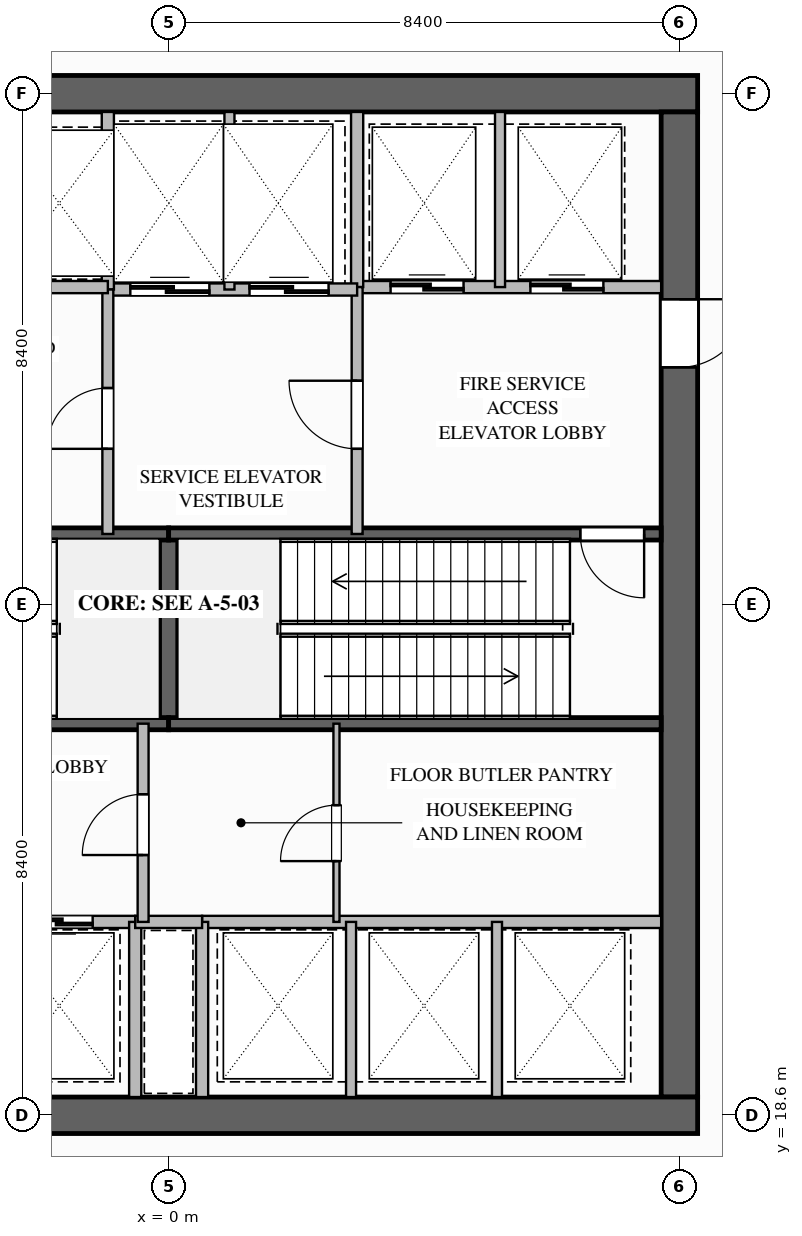
"""IFC4 building model, lengths in metres.
Left out: names, types, materials, properties, quantities, classifications, styles, units other than length and angle.
Written with IfcOpenShell. Run it as: python <this file> out.ifc"""

import sys

from ifc_helpers import new_model, si_unit, direction, frame, frame_2d, origin, place, context, subcontext, project, spatial, rectangle, extrude, element, fill, save


model = new_model("IFC4")
c1 = context("Model", 3, precision=1e-05, world=origin(), true_north=direction((0.0, 1.0)))
c2 = subcontext(c1, "Body", "Model", "MODEL_VIEW")
j1 = project(units=[si_unit("LENGTHUNIT", "METRE"), si_unit("PLANEANGLEUNIT", "RADIAN")], contexts=[c1])
p1 = place(None, origin())
s1 = spatial("IfcSite", under=j1, at=p1, CompositionType="ELEMENT")
p2 = place(p1, origin())
s2 = spatial("IfcBuilding", under=s1, at=p2, CompositionType="ELEMENT")
p3 = place(p2, frame((0.0, 0.0, 10.8)))
s3 = spatial("IfcBuildingStorey", under=s2, at=p3, CompositionType="ELEMENT", Elevation=10.8)
p4 = place(p3, frame((-8.7, 35.4, 0.0), z_axis=(0.0, 0.0, 1.0), x_axis=(1.0, 0.0, 0.0)))
e1 = element("IfcWall", 1, at=p4, inside=s3, PredefinedType="SHEAR", context=c2, shape_type="SweptSolid", body=[
    extrude(rectangle(XDim=17.4, YDim=0.6, at=frame_2d((8.7, 0.0))), origin(), (0.0, 0.0, 1.0), 6.4),
])
p5 = place(p3, frame((8.4, 35.1, 0.0), z_axis=(0.0, 0.0, 1.0), x_axis=(0.0, -1.0, 0.0)))
e2 = element("IfcWall", 2, at=p5, inside=s3, PredefinedType="SHEAR", context=c2, shape_type="SweptSolid", body=[
    extrude(rectangle(XDim=16.2, YDim=0.6, at=frame_2d((8.1, 0.0))), origin(), (0.0, 0.0, 1.0), 6.4),
])
p6 = place(p5, frame((3.08, 0.0, 0.0)))
e3 = element("IfcOpeningElement", 3, at=p6, cuts=e2, PredefinedType="OPENING", context=c2, shape_type="SweptSolid", body=[
    extrude(rectangle(XDim=1.12, YDim=2.1, at=frame_2d((0.56, 1.05))), frame((0.0, 0.31, 0.0), z_axis=(0.0, -1.0, 0.0), x_axis=(1.0, 0.0, 0.0)), (0.0, 0.0, 1.0), 0.62),
])
p7 = place(p3, frame((8.7, 18.6, 0.0), z_axis=(0.0, 0.0, 1.0), x_axis=(-1.0, 0.0, 0.0)))
e4 = element("IfcWall", 4, at=p7, inside=s3, PredefinedType="SHEAR", context=c2, shape_type="SweptSolid", body=[
    extrude(rectangle(XDim=17.4, YDim=0.6, at=frame_2d((8.7, 0.0))), origin(), (0.0, 0.0, 1.0), 6.4),
])
p8 = place(p3, frame((0.0, 25.04, 0.0), z_axis=(0.0, 0.0, 1.0), x_axis=(0.0, 1.0, 0.0)))
e5 = element("IfcWall", 5, at=p8, inside=s3, PredefinedType="SOLIDWALL", context=c2, shape_type="SweptSolid", body=[
    extrude(rectangle(XDim=3.12, YDim=0.3, at=frame_2d((1.56, 0.0))), origin(), (0.0, 0.0, 1.0), 6.1),
])
p9 = place(p3, frame((-8.1, 25.04, 0.0), z_axis=(0.0, 0.0, 1.0), x_axis=(1.0, 0.0, 0.0)))
e6 = element("IfcWall", 6, at=p9, inside=s3, PredefinedType="SOLIDWALL", context=c2, shape_type="SweptSolid", body=[
    extrude(rectangle(XDim=8.1, YDim=0.2, at=frame_2d((4.05, 0.0))), origin(), (0.0, 0.0, 1.0), 6.1),
])
p10 = place(p9, frame((0.28, 0.0, 0.0)))
e7 = element("IfcOpeningElement", 7, at=p10, cuts=e6, PredefinedType="OPENING", context=c2, shape_type="SweptSolid", body=[
    extrude(rectangle(XDim=1.05, YDim=2.1, at=frame_2d((0.525, 1.05))), frame((0.0, 0.11, 0.0), z_axis=(0.0, -1.0, 0.0), x_axis=(1.0, 0.0, 0.0)), (0.0, 0.0, 1.0), 0.22),
])
for number, where, z_axis, x_axis in (
    (8, (-8.1, 28.16, 0.0), (0.0, 0.0, 1.0), (1.0, 0.0, 0.0)),
    (9, (0.0, 25.04, 0.0), (0.0, 0.0, 1.0), (1.0, 0.0, 0.0)),
):
    element("IfcWall", number, at=place(p3, frame(where, z_axis=z_axis, x_axis=x_axis)), inside=s3, PredefinedType="SOLIDWALL", context=c2, shape_type="SweptSolid", body=[
        extrude(rectangle(XDim=8.1, YDim=0.2, at=frame_2d((4.05, 0.0))), origin(), (0.0, 0.0, 1.0), 6.1),
    ])
p11 = place(p3, frame((8.1, 28.16, 0.0), z_axis=(0.0, 0.0, 1.0), x_axis=(-1.0, 0.0, 0.0)))
e10 = element("IfcWall", 10, at=p11, inside=s3, PredefinedType="SOLIDWALL", context=c2, shape_type="SweptSolid", body=[
    extrude(rectangle(XDim=8.1, YDim=0.2, at=frame_2d((4.05, 0.0))), origin(), (0.0, 0.0, 1.0), 6.1),
])
p12 = place(p11, frame((0.28, 0.0, 0.0)))
e11 = element("IfcOpeningElement", 11, at=p12, cuts=e10, PredefinedType="OPENING", context=c2, shape_type="SweptSolid", body=[
    extrude(rectangle(XDim=1.05, YDim=2.1, at=frame_2d((0.525, 1.05))), frame((0.0, 0.11, 0.0), z_axis=(0.0, -1.0, 0.0), x_axis=(1.0, 0.0, 0.0)), (0.0, 0.0, 1.0), 0.22),
])
p13 = place(p3, frame((3.1, 32.22, 0.0), z_axis=(0.0, 0.0, 1.0), x_axis=(1.0, 0.0, 0.0)))
e12 = element("IfcWall", 12, at=p13, inside=s3, PredefinedType="SOLIDWALL", context=c2, shape_type="SweptSolid", body=[
    extrude(rectangle(XDim=5.0, YDim=0.2, at=frame_2d((2.5, 0.0))), origin(), (0.0, 0.0, 1.0), 6.1),
])
p14 = place(p13, frame((0.55, 0.0, 0.0)))
e13 = element("IfcOpeningElement", 13, at=p14, cuts=e12, PredefinedType="OPENING", context=c2, shape_type="SweptSolid", body=[
    extrude(rectangle(XDim=1.2, YDim=2.2, at=frame_2d((0.6, 1.1))), frame((0.0, 0.11, 0.0), z_axis=(0.0, -1.0, 0.0), x_axis=(1.0, 0.0, 0.0)), (0.0, 0.0, 1.0), 0.22),
])
p15 = place(p13, frame((2.85, 0.0, 0.0)))
e14 = element("IfcOpeningElement", 14, at=p15, cuts=e12, PredefinedType="OPENING", context=c2, shape_type="SweptSolid", body=[
    extrude(rectangle(XDim=1.2, YDim=2.2, at=frame_2d((0.6, 1.1))), frame((0.0, 0.11, 0.0), z_axis=(0.0, -1.0, 0.0), x_axis=(1.0, 0.0, 0.0)), (0.0, 0.0, 1.0), 0.22),
])
p16 = place(p3, frame((3.1, 32.22, 0.0), z_axis=(0.0, 0.0, 1.0), x_axis=(0.0, 1.0, 0.0)))
e15 = element("IfcWall", 15, at=p16, inside=s3, PredefinedType="SOLIDWALL", context=c2, shape_type="SweptSolid", body=[
    extrude(rectangle(XDim=2.88, YDim=0.2, at=frame_2d((1.44, 0.0))), origin(), (0.0, 0.0, 1.0), 6.1),
])
p17 = place(p3, frame((5.45, 32.22, 0.0), z_axis=(0.0, 0.0, 1.0), x_axis=(0.0, 1.0, 0.0)))
e16 = element("IfcWall", 16, at=p17, inside=s3, PredefinedType="PARTITIONING", context=c2, shape_type="SweptSolid", body=[
    extrude(rectangle(XDim=2.88, YDim=0.165, at=frame_2d((1.44, 0.0))), origin(), (0.0, 0.0, 1.0), 6.1),
])
p18 = place(p3, frame((3.1, 28.16, 0.0), z_axis=(0.0, 0.0, 1.0), x_axis=(0.0, 1.0, 0.0)))
e17 = element("IfcWall", 17, at=p18, inside=s3, PredefinedType="SOLIDWALL", context=c2, shape_type="SweptSolid", body=[
    extrude(rectangle(XDim=4.06, YDim=0.18, at=frame_2d((2.03, 0.0))), origin(), (0.0, 0.0, 1.0), 6.1),
])
p19 = place(p18, frame((1.4, 0.0, 0.0)))
e18 = element("IfcOpeningElement", 18, at=p19, cuts=e17, PredefinedType="OPENING", context=c2, shape_type="SweptSolid", body=[
    extrude(rectangle(XDim=1.12, YDim=2.1, at=frame_2d((0.56, 1.05))), frame((0.0, 0.1, 0.0), z_axis=(0.0, -1.0, 0.0), x_axis=(1.0, 0.0, 0.0)), (0.0, 0.0, 1.0), 0.2),
])
p20 = place(p3, frame((-1.0, 32.18, 0.0), z_axis=(0.0, 0.0, 1.0), x_axis=(1.0, 0.0, 0.0)))
e19 = element("IfcWall", 19, at=p20, inside=s3, PredefinedType="SOLIDWALL", context=c2, shape_type="SweptSolid", body=[
    extrude(rectangle(XDim=4.1, YDim=0.2, at=frame_2d((2.05, 0.0))), origin(), (0.0, 0.0, 1.0), 6.1),
])
p21 = place(p20, frame((0.37, 0.0, 0.0)))
e20 = element("IfcOpeningElement", 20, at=p21, cuts=e19, PredefinedType="OPENING", context=c2, shape_type="SweptSolid", body=[
    extrude(rectangle(XDim=1.3, YDim=2.2, at=frame_2d((0.65, 1.1))), frame((0.0, 0.11, 0.0), z_axis=(0.0, -1.0, 0.0), x_axis=(1.0, 0.0, 0.0)), (0.0, 0.0, 1.0), 0.22),
])
p22 = place(p20, frame((2.33, 0.0, 0.0)))
e21 = element("IfcOpeningElement", 21, at=p22, cuts=e19, PredefinedType="OPENING", context=c2, shape_type="SweptSolid", body=[
    extrude(rectangle(XDim=1.3, YDim=2.2, at=frame_2d((0.65, 1.1))), frame((0.0, 0.11, 0.0), z_axis=(0.0, -1.0, 0.0), x_axis=(1.0, 0.0, 0.0)), (0.0, 0.0, 1.0), 0.22),
])
p23 = place(p3, frame((-1.0, 32.18, 0.0), z_axis=(0.0, 0.0, 1.0), x_axis=(0.0, 1.0, 0.0)))
e22 = element("IfcWall", 22, at=p23, inside=s3, PredefinedType="SOLIDWALL", context=c2, shape_type="SweptSolid", body=[
    extrude(rectangle(XDim=2.92, YDim=0.2, at=frame_2d((1.46, 0.0))), origin(), (0.0, 0.0, 1.0), 6.1),
])
p24 = place(p3, frame((1.0, 32.18, 0.0), z_axis=(0.0, 0.0, 1.0), x_axis=(0.0, 1.0, 0.0)))
e23 = element("IfcWall", 23, at=p24, inside=s3, PredefinedType="PARTITIONING", context=c2, shape_type="SweptSolid", body=[
    extrude(rectangle(XDim=2.92, YDim=0.165, at=frame_2d((1.46, 0.0))), origin(), (0.0, 0.0, 1.0), 6.1),
])
p25 = place(p3, frame((-1.0, 28.16, 0.0), z_axis=(0.0, 0.0, 1.0), x_axis=(0.0, 1.0, 0.0)))
e24 = element("IfcWall", 24, at=p25, inside=s3, PredefinedType="SOLIDWALL", context=c2, shape_type="SweptSolid", body=[
    extrude(rectangle(XDim=4.02, YDim=0.18, at=frame_2d((2.01, 0.0))), origin(), (0.0, 0.0, 1.0), 6.1),
])
p26 = place(p25, frame((1.4, 0.0, 0.0)))
e25 = element("IfcOpeningElement", 25, at=p26, cuts=e24, PredefinedType="OPENING", context=c2, shape_type="SweptSolid", body=[
    extrude(rectangle(XDim=1.0, YDim=2.1, at=frame_2d((0.5, 1.05))), frame((0.0, 0.1, 0.0), z_axis=(0.0, -1.0, 0.0), x_axis=(1.0, 0.0, 0.0)), (0.0, 0.0, 1.0), 0.2),
])
p27 = place(p3, frame((-8.1, 32.22, 0.0), z_axis=(0.0, 0.0, 1.0), x_axis=(1.0, 0.0, 0.0)))
e26 = element("IfcWall", 26, at=p27, inside=s3, PredefinedType="SOLIDWALL", context=c2, shape_type="SweptSolid", body=[
    extrude(rectangle(XDim=7.1, YDim=0.2, at=frame_2d((3.55, 0.0))), origin(), (0.0, 0.0, 1.0), 6.1),
])
p28 = place(p3, frame((-0.55, 21.78, 0.0), z_axis=(0.0, 0.0, 1.0), x_axis=(-1.0, 0.0, 0.0)))
e27 = element("IfcWall", 27, at=p28, inside=s3, PredefinedType="SOLIDWALL", context=c2, shape_type="SweptSolid", body=[
    extrude(rectangle(XDim=7.55, YDim=0.2, at=frame_2d((3.775, 0.0))), origin(), (0.0, 0.0, 1.0), 6.1),
])
p29 = place(p28, frame((5.5, 0.0, 0.0)))
e28 = element("IfcOpeningElement", 28, at=p29, cuts=e27, PredefinedType="OPENING", context=c2, shape_type="SweptSolid", body=[
    extrude(rectangle(XDim=1.1, YDim=2.2, at=frame_2d((0.55, 1.1))), frame((0.0, 0.11, 0.0), z_axis=(0.0, -1.0, 0.0), x_axis=(1.0, 0.0, 0.0)), (0.0, 0.0, 1.0), 0.22),
])
p30 = place(p28, frame((3.1, 0.0, 0.0)))
e29 = element("IfcOpeningElement", 29, at=p30, cuts=e27, PredefinedType="OPENING", context=c2, shape_type="SweptSolid", body=[
    extrude(rectangle(XDim=1.1, YDim=2.2, at=frame_2d((0.55, 1.1))), frame((0.0, 0.11, 0.0), z_axis=(0.0, -1.0, 0.0), x_axis=(1.0, 0.0, 0.0)), (0.0, 0.0, 1.0), 0.22),
])
p31 = place(p28, frame((0.7, 0.0, 0.0)))
e30 = element("IfcOpeningElement", 30, at=p31, cuts=e27, PredefinedType="OPENING", context=c2, shape_type="SweptSolid", body=[
    extrude(rectangle(XDim=1.1, YDim=2.2, at=frame_2d((0.55, 1.1))), frame((0.0, 0.11, 0.0), z_axis=(0.0, -1.0, 0.0), x_axis=(1.0, 0.0, 0.0)), (0.0, 0.0, 1.0), 0.22),
])
p32 = place(p3, frame((-0.55, 18.9, 0.0), z_axis=(0.0, 0.0, 1.0), x_axis=(0.0, 1.0, 0.0)))
e31 = element("IfcWall", 31, at=p32, inside=s3, PredefinedType="SOLIDWALL", context=c2, shape_type="SweptSolid", body=[
    extrude(rectangle(XDim=2.88, YDim=0.2, at=frame_2d((1.44, 0.0))), origin(), (0.0, 0.0, 1.0), 6.1),
])
p33 = place(p3, frame((8.1, 21.78, 0.0), z_axis=(0.0, 0.0, 1.0), x_axis=(-1.0, 0.0, 0.0)))
e32 = element("IfcWall", 32, at=p33, inside=s3, PredefinedType="SOLIDWALL", context=c2, shape_type="SweptSolid", body=[
    extrude(rectangle(XDim=7.55, YDim=0.2, at=frame_2d((3.775, 0.0))), origin(), (0.0, 0.0, 1.0), 6.1),
])
p34 = place(p3, frame((0.55, 18.9, 0.0), z_axis=(0.0, 0.0, 1.0), x_axis=(0.0, 1.0, 0.0)))
e33 = element("IfcWall", 33, at=p34, inside=s3, PredefinedType="SOLIDWALL", context=c2, shape_type="SweptSolid", body=[
    extrude(rectangle(XDim=2.88, YDim=0.2, at=frame_2d((1.44, 0.0))), origin(), (0.0, 0.0, 1.0), 6.1),
])
for number, where, z_axis, x_axis in (
    (34, (3.0, 18.9, 0.0), (0.0, 0.0, 1.0), (0.0, 1.0, 0.0)),
    (35, (5.4, 18.9, 0.0), (0.0, 0.0, 1.0), (0.0, 1.0, 0.0)),
):
    element("IfcWall", number, at=place(p3, frame(where, z_axis=z_axis, x_axis=x_axis)), inside=s3, PredefinedType="PARTITIONING", context=c2, shape_type="SweptSolid", body=[
        extrude(rectangle(XDim=2.88, YDim=0.165, at=frame_2d((1.44, 0.0))), origin(), (0.0, 0.0, 1.0), 6.1),
    ])
p35 = place(p3, frame((-0.55, 21.78, 0.0), z_axis=(0.0, 0.0, 1.0), x_axis=(1.0, 0.0, 0.0)))
e36 = element("IfcWall", 36, at=p35, inside=s3, PredefinedType="SOLIDWALL", context=c2, shape_type="SweptSolid", body=[
    extrude(rectangle(XDim=1.1, YDim=0.2, at=frame_2d((0.55, 0.0))), origin(), (0.0, 0.0, 1.0), 6.1),
])
p36 = place(p3, frame((-0.42, 21.78, 0.0), z_axis=(0.0, 0.0, 1.0), x_axis=(0.0, 1.0, 0.0)))
e37 = element("IfcWall", 37, at=p36, inside=s3, PredefinedType="SOLIDWALL", context=c2, shape_type="SweptSolid", body=[
    extrude(rectangle(XDim=3.26, YDim=0.18, at=frame_2d((1.63, 0.0))), origin(), (0.0, 0.0, 1.0), 6.1),
])
p37 = place(p36, frame((1.1, 0.0, 0.0)))
e38 = element("IfcOpeningElement", 38, at=p37, cuts=e37, PredefinedType="OPENING", context=c2, shape_type="SweptSolid", body=[
    extrude(rectangle(XDim=1.0, YDim=2.1, at=frame_2d((0.5, 1.05))), frame((0.0, 0.1, 0.0), z_axis=(0.0, -1.0, 0.0), x_axis=(1.0, 0.0, 0.0)), (0.0, 0.0, 1.0), 0.2),
])
p38 = place(p3, frame((2.76, 21.78, 0.0), z_axis=(0.0, 0.0, 1.0), x_axis=(0.0, 1.0, 0.0)))
e39 = element("IfcWall", 39, at=p38, inside=s3, PredefinedType="PARTITIONING", context=c2, shape_type="SweptSolid", body=[
    extrude(rectangle(XDim=3.26, YDim=0.1, at=frame_2d((1.63, 0.0))), origin(), (0.0, 0.0, 1.0), 6.1),
])
p39 = place(p38, frame((1.0, 0.0, 0.0)))
e40 = element("IfcOpeningElement", 40, at=p39, cuts=e39, PredefinedType="OPENING", context=c2, shape_type="SweptSolid", body=[
    extrude(rectangle(XDim=0.92, YDim=2.1, at=frame_2d((0.46, 1.05))), frame((0.0, 0.06, 0.0), z_axis=(0.0, -1.0, 0.0), x_axis=(1.0, 0.0, 0.0)), (0.0, 0.0, 1.0), 0.12),
])
p40 = place(p12, origin())
e41 = element("IfcDoor", 41, at=p40, inside=s3, OperationType="SINGLE_SWING_LEFT", PredefinedType="DOOR", context=c2, shape_type="SweptSolid", body=[
    extrude(rectangle(XDim=1.05, YDim=2.1, at=frame_2d((0.525, 1.05))), frame((0.0, 0.025, 0.0), z_axis=(0.0, -1.0, 0.0), x_axis=(1.0, 0.0, 0.0)), (0.0, 0.0, 1.0), 0.05),
])
fill(e11, e41)
p41 = place(p14, origin())
e42 = element("IfcDoor", 42, at=p41, inside=s3, OperationType="SLIDING_TO_LEFT", PredefinedType="DOOR", context=c2, shape_type="SweptSolid", body=[
    extrude(rectangle(XDim=1.2, YDim=2.2, at=frame_2d((0.6, 1.1))), frame((0.0, 0.025, 0.0), z_axis=(0.0, -1.0, 0.0), x_axis=(1.0, 0.0, 0.0)), (0.0, 0.0, 1.0), 0.05),
])
fill(e13, e42)
p42 = place(p15, origin())
e43 = element("IfcDoor", 43, at=p42, inside=s3, OperationType="SLIDING_TO_LEFT", PredefinedType="DOOR", context=c2, shape_type="SweptSolid", body=[
    extrude(rectangle(XDim=1.2, YDim=2.2, at=frame_2d((0.6, 1.1))), frame((0.0, 0.025, 0.0), z_axis=(0.0, -1.0, 0.0), x_axis=(1.0, 0.0, 0.0)), (0.0, 0.0, 1.0), 0.05),
])
fill(e14, e43)
p43 = place(p19, origin())
e44 = element("IfcDoor", 44, at=p43, inside=s3, OperationType="SINGLE_SWING_RIGHT", PredefinedType="DOOR", context=c2, shape_type="SweptSolid", body=[
    extrude(rectangle(XDim=1.12, YDim=2.1, at=frame_2d((0.56, 1.05))), frame((0.0, 0.025, 0.0), z_axis=(0.0, -1.0, 0.0), x_axis=(1.0, 0.0, 0.0)), (0.0, 0.0, 1.0), 0.05),
])
fill(e18, e44)
p44 = place(p6, origin())
e45 = element("IfcDoor", 45, at=p44, inside=s3, OperationType="SINGLE_SWING_LEFT", PredefinedType="DOOR", context=c2, shape_type="SweptSolid", body=[
    extrude(rectangle(XDim=1.12, YDim=2.1, at=frame_2d((0.56, 1.05))), frame((0.0, 0.025, 0.0), z_axis=(0.0, -1.0, 0.0), x_axis=(1.0, 0.0, 0.0)), (0.0, 0.0, 1.0), 0.05),
])
fill(e3, e45)
p45 = place(p21, origin())
e46 = element("IfcDoor", 46, at=p45, inside=s3, OperationType="SLIDING_TO_LEFT", PredefinedType="DOOR", context=c2, shape_type="SweptSolid", body=[
    extrude(rectangle(XDim=1.3, YDim=2.2, at=frame_2d((0.65, 1.1))), frame((0.0, 0.025, 0.0), z_axis=(0.0, -1.0, 0.0), x_axis=(1.0, 0.0, 0.0)), (0.0, 0.0, 1.0), 0.05),
])
fill(e20, e46)
p46 = place(p22, origin())
e47 = element("IfcDoor", 47, at=p46, inside=s3, OperationType="SLIDING_TO_LEFT", PredefinedType="DOOR", context=c2, shape_type="SweptSolid", body=[
    extrude(rectangle(XDim=1.3, YDim=2.2, at=frame_2d((0.65, 1.1))), frame((0.0, 0.025, 0.0), z_axis=(0.0, -1.0, 0.0), x_axis=(1.0, 0.0, 0.0)), (0.0, 0.0, 1.0), 0.05),
])
fill(e21, e47)
p47 = place(p26, origin())
e48 = element("IfcDoor", 48, at=p47, inside=s3, OperationType="SINGLE_SWING_LEFT", PredefinedType="DOOR", context=c2, shape_type="SweptSolid", body=[
    extrude(rectangle(XDim=1.0, YDim=2.1, at=frame_2d((0.5, 1.05))), frame((0.0, 0.025, 0.0), z_axis=(0.0, -1.0, 0.0), x_axis=(1.0, 0.0, 0.0)), (0.0, 0.0, 1.0), 0.05),
])
fill(e25, e48)
p48 = place(p31, origin())
e49 = element("IfcDoor", 49, at=p48, inside=s3, OperationType="SLIDING_TO_LEFT", PredefinedType="DOOR", context=c2, shape_type="SweptSolid", body=[
    extrude(rectangle(XDim=1.1, YDim=2.2, at=frame_2d((0.55, 1.1))), frame((0.0, 0.025, 0.0), z_axis=(0.0, -1.0, 0.0), x_axis=(1.0, 0.0, 0.0)), (0.0, 0.0, 1.0), 0.05),
])
fill(e30, e49)
p49 = place(p37, origin())
e50 = element("IfcDoor", 50, at=p49, inside=s3, OperationType="SINGLE_SWING_LEFT", PredefinedType="DOOR", context=c2, shape_type="SweptSolid", body=[
    extrude(rectangle(XDim=1.0, YDim=2.1, at=frame_2d((0.5, 1.05))), frame((0.0, 0.025, 0.0), z_axis=(0.0, -1.0, 0.0), x_axis=(1.0, 0.0, 0.0)), (0.0, 0.0, 1.0), 0.05),
])
fill(e38, e50)
p50 = place(p39, origin())
e51 = element("IfcDoor", 51, at=p50, inside=s3, OperationType="SINGLE_SWING_LEFT", PredefinedType="DOOR", context=c2, shape_type="SweptSolid", body=[
    extrude(rectangle(XDim=0.92, YDim=2.1, at=frame_2d((0.46, 1.05))), frame((0.0, 0.025, 0.0), z_axis=(0.0, -1.0, 0.0), x_axis=(1.0, 0.0, 0.0)), (0.0, 0.0, 1.0), 0.05),
])
fill(e40, e51)
save(model, sys.argv[1])
